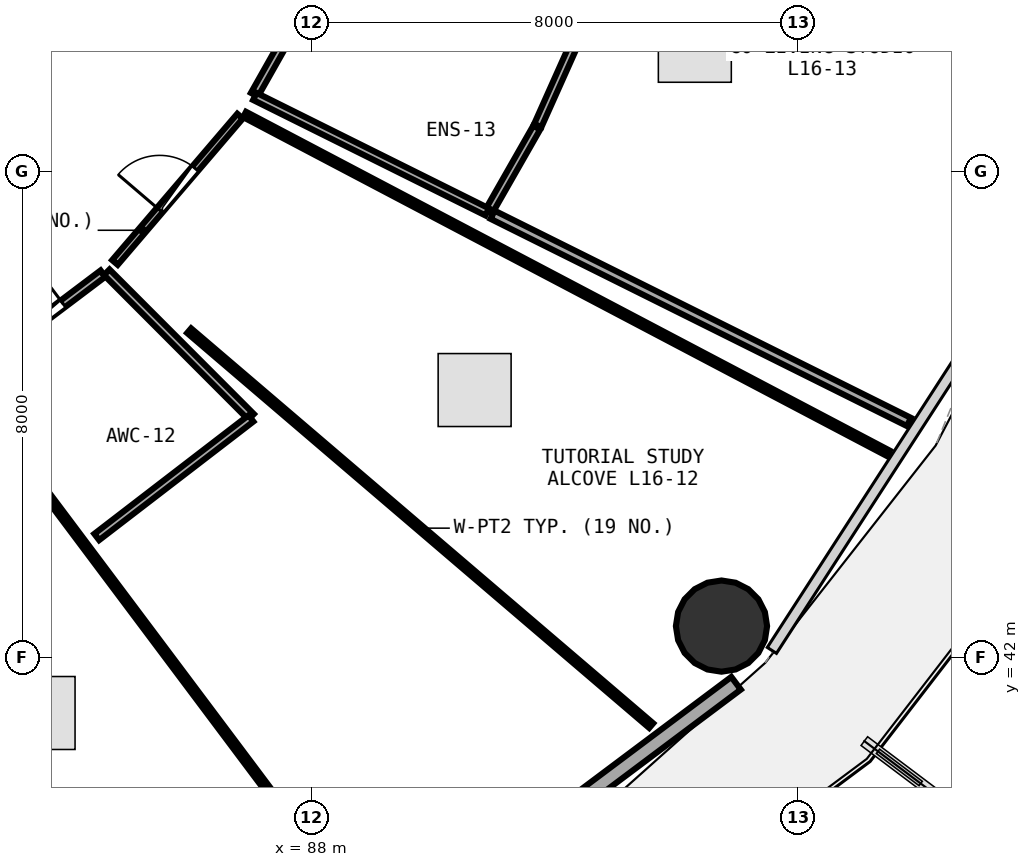
"""IFC4 building model, lengths in metres.
Left out: names, types, materials, properties, quantities, classifications, styles, units other than length and angle.
Written with IfcOpenShell. Run it as: python <this file> out.ifc"""

import sys

from ifc_helpers import new_model, si_unit, direction, frame, frame_2d, origin, origin_2d, place, context, subcontext, project, spatial, rectangle, circle, extrude, element, fill, save


model = new_model("IFC4")
c1 = context("Model", 3, precision=1e-05, world=origin(), true_north=direction((0.0, 1.0)))
c2 = subcontext(c1, "Body", "Model", "MODEL_VIEW")
j1 = project(units=[si_unit("LENGTHUNIT", "METRE"), si_unit("PLANEANGLEUNIT", "RADIAN")], contexts=[c1])
p1 = place(None, origin())
s1 = spatial("IfcSite", under=j1, at=p1, CompositionType="ELEMENT")
p2 = place(p1, origin())
s2 = spatial("IfcBuilding", under=s1, at=p2, CompositionType="ELEMENT")
p3 = place(p2, frame((0.0, 0.0, 63.75)))
s3 = spatial("IfcBuildingStorey", under=s2, at=p3, CompositionType="ELEMENT", Elevation=63.75)
p4 = place(p3, frame((94.744, 42.522, 0.0), z_axis=(0.0, 0.0, 1.0), x_axis=(1.0, 0.0, 0.0)))
e1 = element("IfcColumn", 1, at=p4, inside=s3, PredefinedType="COLUMN", context=c2, shape_type="SweptSolid", body=[
    extrude(circle(Radius=0.75, at=origin_2d()), origin(), (0.0, 0.0, 1.0), 3.75),
])
p5 = place(p3, frame((88.349, 36.611, 0.0), z_axis=(0.0, 0.0, 1.0), x_axis=(0.80030733173, 0.599590005569, 0.0)))
e2 = element("IfcWall", 2, at=p5, inside=s3, PredefinedType="SOLIDWALL", context=c2, shape_type="SweptSolid", body=[
    extrude(rectangle(XDim=8.291, YDim=0.26, at=frame_2d((4.145, 0.0))), origin(), (0.0, 0.0, 1.0), 3.475),
])
p6 = place(p5, frame((3.345, 0.0, 0.85)))
e3 = element("IfcOpeningElement", 3, at=p6, cuts=e2, PredefinedType="OPENING", context=c2, shape_type="SweptSolid", body=[
    extrude(rectangle(XDim=1.6, YDim=1.45, at=frame_2d((0.8, 0.725))), frame((0.0, 0.14, 0.0), z_axis=(0.0, -1.0, 0.0), x_axis=(1.0, 0.0, 0.0)), (0.0, 0.0, 1.0), 0.28),
])
p7 = place(p3, frame((82.573, 46.811, 0.0), z_axis=(0.0, 0.0, 1.0), x_axis=(0.7983589592, 0.602181843188, 0.0)))
e4 = element("IfcWall", 4, at=p7, inside=s3, PredefinedType="PLUMBINGWALL", context=c2, shape_type="SweptSolid", body=[
    extrude(rectangle(XDim=2.504, YDim=0.13, at=frame_2d((1.252, 0.0))), origin(), (0.0, 0.0, 1.0), 2.875),
])
p8 = place(p7, frame((0.822, 0.0, 0.0)))
e5 = element("IfcOpeningElement", 5, at=p8, cuts=e4, PredefinedType="OPENING", context=c2, shape_type="SweptSolid", body=[
    extrude(rectangle(XDim=0.86, YDim=2.05, at=frame_2d((0.43, 1.025))), frame((0.0, 0.075, 0.0), z_axis=(0.0, -1.0, 0.0), x_axis=(1.0, 0.0, 0.0)), (0.0, 0.0, 1.0), 0.15),
])
p9 = place(p3, frame((84.769, 48.502, 0.0), z_axis=(0.0, 0.0, 1.0), x_axis=(0.649870238328, 0.760045178483, 0.0)))
e6 = element("IfcWall", 6, at=p9, inside=s3, PredefinedType="PARTITIONING", context=c2, shape_type="SweptSolid", body=[
    extrude(rectangle(XDim=3.167, YDim=0.12, at=frame_2d((1.583, 0.0))), origin(), (0.0, 0.0, 1.0), 2.875),
])
p10 = place(p9, frame((1.133, 0.0, 0.0)))
e7 = element("IfcOpeningElement", 7, at=p10, cuts=e6, PredefinedType="OPENING", context=c2, shape_type="SweptSolid", body=[
    extrude(rectangle(XDim=0.9, YDim=2.08, at=frame_2d((0.45, 1.04))), frame((0.0, 0.07, 0.0), z_axis=(0.0, -1.0, 0.0), x_axis=(1.0, 0.0, 0.0)), (0.0, 0.0, 1.0), 0.14),
])
p11 = place(p3, frame((82.244, 46.557, 0.0), z_axis=(0.0, 0.0, 1.0), x_axis=(0.599892569248, -0.800080561794, 0.0)))
e8 = element("IfcWall", 8, at=p11, inside=s3, PredefinedType="PARTITIONING", context=c2, shape_type="SweptSolid", body=[
    extrude(rectangle(XDim=11.272, YDim=0.1, at=frame_2d((5.636, 0.0))), origin(), (0.0, 0.0, 1.0), 2.875),
])
p12 = place(p3, frame((84.634, 48.341, 0.0), z_axis=(0.0, 0.0, 1.0), x_axis=(0.706525219412, -0.707687865047, 0.0)))
e9 = element("IfcWall", 9, at=p12, inside=s3, PredefinedType="PLUMBINGWALL", context=c2, shape_type="SweptSolid", body=[
    extrude(rectangle(XDim=3.36, YDim=0.13, at=frame_2d((1.68, 0.0))), origin(), (0.0, 0.0, 1.0), 3.235),
])
p13 = place(p3, frame((87.006, 45.937, 0.0), z_axis=(0.0, 0.0, 1.0), x_axis=(-0.792836735531, -0.609434090606, 0.0)))
e10 = element("IfcWall", 10, at=p13, inside=s3, PredefinedType="PLUMBINGWALL", context=c2, shape_type="SweptSolid", body=[
    extrude(rectangle(XDim=3.199, YDim=0.13, at=frame_2d((1.599, 0.0))), origin(), (0.0, 0.0, 1.0), 2.875),
])
p14 = place(p3, frame((86.901, 50.935, 0.0), z_axis=(0.0, 0.0, 1.0), x_axis=(0.884914680824, -0.46575316173, 0.0)))
e11 = element("IfcWall", 11, at=p14, inside=s3, PredefinedType="PARTITIONING", context=c2, shape_type="SweptSolid", body=[
    extrude(rectangle(XDim=11.963, YDim=0.1, at=frame_2d((5.981, 0.0))), origin(), (0.0, 0.0, 1.0), 2.875),
])
p15 = place(p3, frame((93.589, 40.885, 0.0), z_axis=(0.0, 0.0, 1.0), x_axis=(-0.760200523841, 0.649688512713, 0.0)))
e12 = element("IfcWall", 12, at=p15, inside=s3, PredefinedType="PARTITIONING", context=c2, shape_type="SweptSolid", body=[
    extrude(rectangle(XDim=9.997, YDim=0.1, at=frame_2d((4.998, 0.0))), origin(), (0.0, 0.0, 1.0), 2.875),
])
p16 = place(p3, frame((87.062, 51.258, 0.0), z_axis=(0.0, 0.0, 1.0), x_axis=(0.492353040676, 0.870395590141, 0.0)))
e13 = element("IfcWall", 13, at=p16, inside=s3, PredefinedType="PLUMBINGWALL", context=c2, shape_type="SweptSolid", body=[
    extrude(rectangle(XDim=1.224, YDim=0.13, at=frame_2d((0.612, 0.0))), origin(), (0.0, 0.0, 1.0), 3.48),
])
p17 = place(p3, frame((92.366, 52.191, 0.0), z_axis=(0.0, 0.0, 1.0), x_axis=(-0.408383071263, -0.912810641429, 0.0)))
e14 = element("IfcWall", 14, at=p17, inside=s3, PredefinedType="PLUMBINGWALL", context=c2, shape_type="SweptSolid", body=[
    extrude(rectangle(XDim=1.573, YDim=0.13, at=frame_2d((0.787, 0.0))), origin(), (0.0, 0.0, 1.0), 3.48),
])
p18 = place(p3, frame((91.705, 50.719, 0.0), z_axis=(0.0, 0.0, 1.0), x_axis=(-0.495740967081, -0.868470433324, 0.0)))
e15 = element("IfcWall", 15, at=p18, inside=s3, PredefinedType="PLUMBINGWALL", context=c2, shape_type="SweptSolid", body=[
    extrude(rectangle(XDim=1.586, YDim=0.13, at=frame_2d((0.793, 0.0))), origin(), (0.0, 0.0, 1.0), 2.875),
])
p19 = place(p3, frame((90.891, 49.333, 0.0), z_axis=(0.0, 0.0, 1.0), x_axis=(-0.895500211225, 0.4450610876, 0.0)))
e16 = element("IfcWall", 16, at=p19, inside=s3, PredefinedType="PLUMBINGWALL", context=c2, shape_type="SweptSolid", body=[
    extrude(rectangle(XDim=4.267, YDim=0.13, at=frame_2d((2.134, 0.0))), origin(), (0.0, 0.0, 1.0), 2.875),
])
p20 = place(p3, frame((97.827, 45.879, 0.0), z_axis=(0.0, 0.0, 1.0), x_axis=(-0.89528739616, 0.445489032724, 0.0)))
e17 = element("IfcWall", 17, at=p20, inside=s3, PredefinedType="PARTITIONING", context=c2, shape_type="SweptSolid", body=[
    extrude(rectangle(XDim=7.648, YDim=0.15, at=frame_2d((3.824, 0.0))), origin(), (0.0, 0.0, 1.0), 2.875),
])
p21 = place(p8, origin())
e18 = element("IfcDoor", 18, at=p21, inside=s3, OperationType="SINGLE_SWING_RIGHT", PredefinedType="DOOR", context=c2, shape_type="SweptSolid", body=[
    extrude(rectangle(XDim=0.86, YDim=2.05, at=frame_2d((0.43, 1.025))), frame((0.0, 0.025, 0.0), z_axis=(0.0, -1.0, 0.0), x_axis=(1.0, 0.0, 0.0)), (0.0, 0.0, 1.0), 0.05),
])
fill(e5, e18)
p22 = place(p10, origin())
e19 = element("IfcDoor", 19, at=p22, inside=s3, OperationType="SINGLE_SWING_LEFT", PredefinedType="DOOR", context=c2, shape_type="SweptSolid", body=[
    extrude(rectangle(XDim=0.9, YDim=2.08, at=frame_2d((0.45, 1.04))), frame((0.0, 0.025, 0.0), z_axis=(0.0, -1.0, 0.0), x_axis=(1.0, 0.0, 0.0)), (0.0, 0.0, 1.0), 0.05),
])
fill(e7, e19)
save(model, sys.argv[1])
